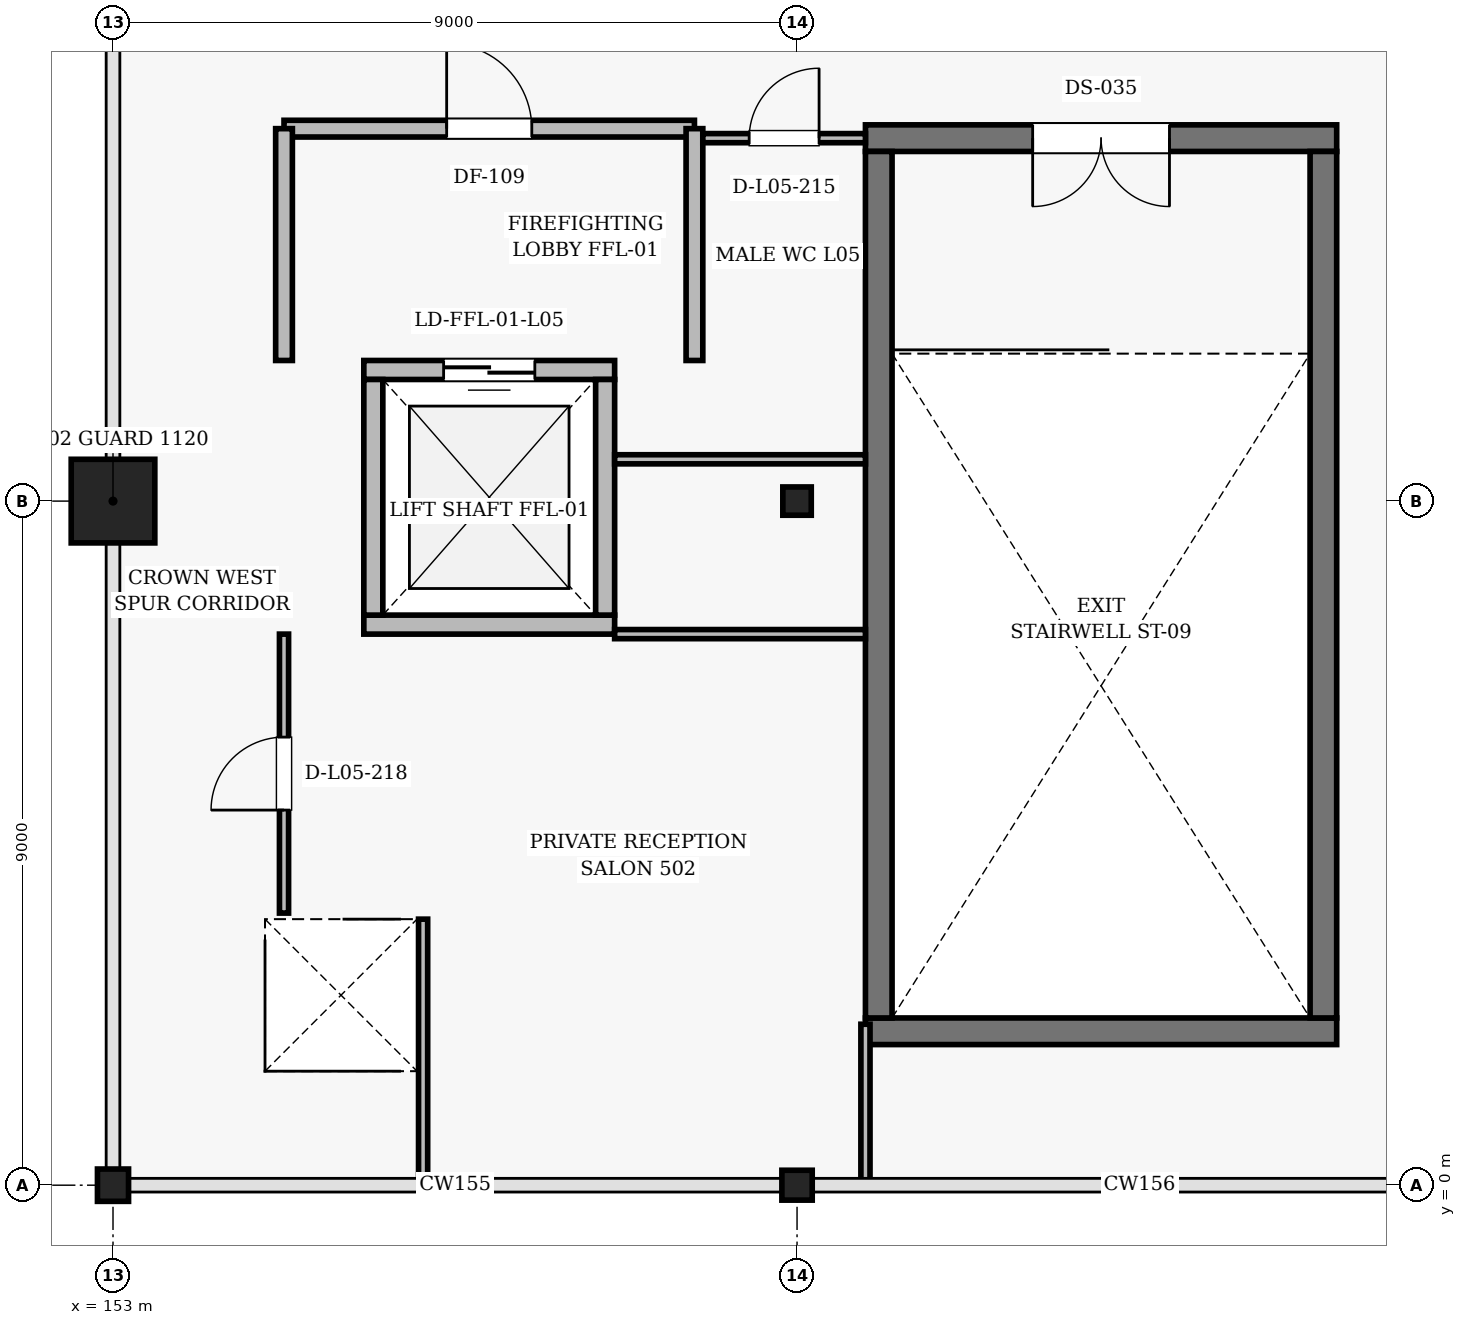
"""IFC4 building model, lengths in metres.
Left out: names, types, materials, properties, quantities, classifications, styles, units other than length and angle.
Written with IfcOpenShell. Run it as: python <this file> out.ifc"""

import sys

from ifc_helpers import new_model, si_unit, direction, frame, frame_2d, origin, origin_2d, place, context, subcontext, project, spatial, rectangle, i_section, extrude, element, fill, save


model = new_model("IFC4")
c1 = context("Model", 3, precision=1e-05, world=origin(), true_north=direction((0.0, 1.0)))
c2 = subcontext(c1, "Body", "Model", "MODEL_VIEW")
j1 = project(units=[si_unit("LENGTHUNIT", "METRE"), si_unit("PLANEANGLEUNIT", "RADIAN")], contexts=[c1])
p1 = place(None, origin())
s1 = spatial("IfcSite", under=j1, at=p1, CompositionType="ELEMENT")
p2 = place(p1, origin())
s2 = spatial("IfcBuilding", under=s1, at=p2, CompositionType="ELEMENT")
p3 = place(p2, frame((0.0, 0.0, 25.2)))
s3 = spatial("IfcBuildingStorey", under=s2, at=p3, CompositionType="ELEMENT", Elevation=25.2)
p4 = place(p3, frame((153.0, 0.0, 0.0), z_axis=(0.0, 0.0, 1.0), x_axis=(1.0, 0.0, 0.0)))
e1 = element("IfcColumn", 1, at=p4, inside=s3, PredefinedType="COLUMN", context=c2, shape_type="SweptSolid", body=[
    extrude(i_section(OverallWidth=0.409, OverallDepth=0.425, WebThickness=0.031, FlangeThickness=0.049, FilletRadius=0.02, at=origin_2d()), origin(), (0.0, 0.0, 1.0), 4.8),
])
p5 = place(p3, frame((153.0, 9.0, 0.0), z_axis=(0.0, 0.0, 1.0), x_axis=(1.0, 0.0, 0.0)))
e2 = element("IfcColumn", 2, at=p5, inside=s3, PredefinedType="COLUMN", context=c2, shape_type="SweptSolid", body=[
    extrude(rectangle(XDim=1.1, YDim=1.1, at=origin_2d()), origin(), (0.0, 0.0, 1.0), 4.8),
])
p6 = place(p3, frame((162.0, 0.0, 0.0), z_axis=(0.0, 0.0, 1.0), x_axis=(1.0, 0.0, 0.0)))
e3 = element("IfcColumn", 3, at=p6, inside=s3, PredefinedType="COLUMN", context=c2, shape_type="SweptSolid", body=[
    extrude(i_section(OverallWidth=0.399, OverallDepth=0.393, WebThickness=0.023, FlangeThickness=0.037, FilletRadius=0.018, at=origin_2d()), origin(), (0.0, 0.0, 1.0), 4.8),
])
p7 = place(p3, frame((162.0, 9.0, 0.0), z_axis=(0.0, 0.0, 1.0), x_axis=(1.0, 0.0, 0.0)))
e4 = element("IfcColumn", 4, at=p7, inside=s3, PredefinedType="COLUMN", context=c2, shape_type="SweptSolid", body=[
    extrude(i_section(OverallWidth=0.374, OverallDepth=0.372, WebThickness=0.016, FlangeThickness=0.026, FilletRadius=0.016, at=origin_2d()), origin(), (0.0, 0.0, 1.0), 4.8),
])
p8 = place(p3, frame((162.9, 2.025, 0.0), z_axis=(0.0, 0.0, 1.0), x_axis=(1.0, 0.0, 0.0)))
e5 = element("IfcWall", 5, at=p8, inside=s3, PredefinedType="SHEAR", context=c2, shape_type="SweptSolid", body=[
    extrude(rectangle(XDim=6.2, YDim=0.35, at=frame_2d((3.1, 0.0))), origin(), (0.0, 0.0, 1.0), 4.8),
])
p9 = place(p3, frame((169.1, 13.775, 0.0), z_axis=(0.0, 0.0, 1.0), x_axis=(-1.0, 0.0, 0.0)))
e6 = element("IfcWall", 6, at=p9, inside=s3, PredefinedType="SHEAR", context=c2, shape_type="SweptSolid", body=[
    extrude(rectangle(XDim=6.2, YDim=0.35, at=frame_2d((3.1, 0.0))), origin(), (0.0, 0.0, 1.0), 4.8),
])
p10 = place(p9, frame((2.2, 0.0, 0.0)))
e7 = element("IfcOpeningElement", 7, at=p10, cuts=e6, PredefinedType="OPENING", context=c2, shape_type="SweptSolid", body=[
    extrude(rectangle(XDim=1.8, YDim=2.2, at=frame_2d((0.9, 1.1))), frame((0.0, 0.185, 0.0), z_axis=(0.0, -1.0, 0.0), x_axis=(1.0, 0.0, 0.0)), (0.0, 0.0, 1.0), 0.37),
])
for number, where, z_axis, x_axis in (
    (8, (163.075, 13.6, 0.0), (0.0, 0.0, 1.0), (0.0, -1.0, 0.0)),
    (9, (168.925, 2.2, 0.0), (0.0, 0.0, 1.0), (0.0, 1.0, 0.0)),
):
    element("IfcWall", number, at=place(p3, frame(where, z_axis=z_axis, x_axis=x_axis)), inside=s3, PredefinedType="SHEAR", context=c2, shape_type="SweptSolid", body=[
        extrude(rectangle(XDim=11.4, YDim=0.35, at=frame_2d((5.7, 0.0))), origin(), (0.0, 0.0, 1.0), 4.8),
    ])
p11 = place(p3, frame((156.3, 7.375, 0.0), z_axis=(0.0, 0.0, 1.0), x_axis=(1.0, 0.0, 0.0)))
e10 = element("IfcWall", 10, at=p11, inside=s3, PredefinedType="SOLIDWALL", context=c2, shape_type="SweptSolid", body=[
    extrude(rectangle(XDim=3.3, YDim=0.25, at=frame_2d((1.65, 0.0))), origin(), (0.0, 0.0, 1.0), 4.6),
])
p12 = place(p3, frame((159.6, 10.725, 0.0), z_axis=(0.0, 0.0, 1.0), x_axis=(-1.0, 0.0, 0.0)))
e11 = element("IfcWall", 11, at=p12, inside=s3, PredefinedType="SOLIDWALL", context=c2, shape_type="SweptSolid", body=[
    extrude(rectangle(XDim=3.3, YDim=0.25, at=frame_2d((1.65, 0.0))), origin(), (0.0, 0.0, 1.0), 4.6),
])
p13 = place(p12, frame((1.05, 0.0, 0.0)))
e12 = element("IfcOpeningElement", 12, at=p13, cuts=e11, PredefinedType="OPENING", context=c2, shape_type="SweptSolid", body=[
    extrude(rectangle(XDim=1.2, YDim=2.25, at=frame_2d((0.6, 1.125))), frame((0.0, 0.135, 0.0), z_axis=(0.0, -1.0, 0.0), x_axis=(1.0, 0.0, 0.0)), (0.0, 0.0, 1.0), 0.27),
])
for number, where, z_axis, x_axis in (
    (13, (156.425, 10.6, 0.0), (0.0, 0.0, 1.0), (0.0, -1.0, 0.0)),
    (14, (159.475, 7.5, 0.0), (0.0, 0.0, 1.0), (0.0, 1.0, 0.0)),
):
    element("IfcWall", number, at=place(p3, frame(where, z_axis=z_axis, x_axis=x_axis)), inside=s3, PredefinedType="SOLIDWALL", context=c2, shape_type="SweptSolid", body=[
        extrude(rectangle(XDim=3.1, YDim=0.25, at=frame_2d((1.55, 0.0))), origin(), (0.0, 0.0, 1.0), 4.09),
    ])
p14 = place(p3, frame((155.25, 13.9, 0.0), z_axis=(0.0, 0.0, 1.0), x_axis=(1.0, 0.0, 0.0)))
e15 = element("IfcWall", 15, at=p14, inside=s3, PredefinedType="SOLIDWALL", context=c2, shape_type="SweptSolid", body=[
    extrude(rectangle(XDim=5.4, YDim=0.22, at=frame_2d((2.7, 0.0))), origin(), (0.0, 0.0, 1.0), 4.6),
])
p15 = place(p14, frame((2.14, 0.0, 0.0)))
e16 = element("IfcOpeningElement", 16, at=p15, cuts=e15, PredefinedType="OPENING", context=c2, shape_type="SweptSolid", body=[
    extrude(rectangle(XDim=1.12, YDim=2.2, at=frame_2d((0.56, 1.1))), frame((0.0, 0.12, 0.0), z_axis=(0.0, -1.0, 0.0), x_axis=(1.0, 0.0, 0.0)), (0.0, 0.0, 1.0), 0.24),
])
for number, where, z_axis, x_axis in (
    (17, (155.25, 10.85, 0.0), (0.0, 0.0, 1.0), (0.0, 1.0, 0.0)),
    (18, (160.65, 10.85, 0.0), (0.0, 0.0, 1.0), (0.0, 1.0, 0.0)),
):
    element("IfcWall", number, at=place(p3, frame(where, z_axis=z_axis, x_axis=x_axis)), inside=s3, PredefinedType="SOLIDWALL", context=c2, shape_type="SweptSolid", body=[
        extrude(rectangle(XDim=3.05, YDim=0.22, at=frame_2d((1.525, 0.0))), origin(), (0.0, 0.0, 1.0), 4.6),
    ])
p16 = place(p3, frame((160.76, 13.775, 0.0), z_axis=(0.0, 0.0, 1.0), x_axis=(1.0, 0.0, 0.0)))
e19 = element("IfcWall", 19, at=p16, inside=s3, PredefinedType="PARTITIONING", context=c2, shape_type="SweptSolid", body=[
    extrude(rectangle(XDim=2.14, YDim=0.12, at=frame_2d((1.07, 0.0))), origin(), (0.0, 0.0, 1.0), 4.101),
])
p17 = place(p16, frame((0.61, 0.0, 0.0)))
e20 = element("IfcOpeningElement", 20, at=p17, cuts=e19, PredefinedType="OPENING", context=c2, shape_type="SweptSolid", body=[
    extrude(rectangle(XDim=0.92, YDim=2.12, at=frame_2d((0.46, 1.06))), frame((0.0, 0.07, 0.0), z_axis=(0.0, -1.0, 0.0), x_axis=(1.0, 0.0, 0.0)), (0.0, 0.0, 1.0), 0.14),
])
p18 = place(p3, frame((162.9, 9.55, 0.0), z_axis=(0.0, 0.0, 1.0), x_axis=(-1.0, 0.0, 0.0)))
e21 = element("IfcWall", 21, at=p18, inside=s3, PredefinedType="PARTITIONING", context=c2, shape_type="SweptSolid", body=[
    extrude(rectangle(XDim=3.3, YDim=0.12, at=frame_2d((1.65, 0.0))), origin(), (0.0, 0.0, 1.0), 4.101),
])
p19 = place(p3, frame((159.6, 7.25, 0.0), z_axis=(0.0, 0.0, 1.0), x_axis=(1.0, 0.0, 0.0)))
e22 = element("IfcWall", 22, at=p19, inside=s3, PredefinedType="PARTITIONING", context=c2, shape_type="SweptSolid", body=[
    extrude(rectangle(XDim=3.3, YDim=0.12, at=frame_2d((1.65, 0.0))), origin(), (0.0, 0.0, 1.0), 4.09),
])
p20 = place(p3, frame((162.9, 2.117, 0.0), z_axis=(0.0, 0.0, 1.0), x_axis=(0.0, -1.0, 0.0)))
e23 = element("IfcWall", 23, at=p20, inside=s3, PredefinedType="PARTITIONING", context=c2, shape_type="SweptSolid", body=[
    extrude(rectangle(XDim=2.105, YDim=0.12, at=frame_2d((1.053, 0.0))), origin(), (0.0, 0.0, 1.0), 3.794),
])
p21 = place(p3, frame((157.08, 0.012, 0.0), z_axis=(0.0, 0.0, 1.0), x_axis=(0.0, 1.0, 0.0)))
e24 = element("IfcWall", 24, at=p21, inside=s3, PredefinedType="PARTITIONING", context=c2, shape_type="SweptSolid", body=[
    extrude(rectangle(XDim=3.488, YDim=0.12, at=frame_2d((1.744, 0.0))), origin(), (0.0, 0.0, 1.0), 3.794),
])
p22 = place(p3, frame((155.25, 3.58, 0.0), z_axis=(0.0, 0.0, 1.0), x_axis=(0.0, 1.0, 0.0)))
e25 = element("IfcWall", 25, at=p22, inside=s3, PredefinedType="PARTITIONING", context=c2, shape_type="SweptSolid", body=[
    extrude(rectangle(XDim=3.67, YDim=0.12, at=frame_2d((1.835, 0.0))), origin(), (0.0, 0.0, 1.0), 4.6),
])
p23 = place(p22, frame((1.355, 0.0, 0.0)))
e26 = element("IfcOpeningElement", 26, at=p23, cuts=e25, PredefinedType="OPENING", context=c2, shape_type="SweptSolid", body=[
    extrude(rectangle(XDim=0.96, YDim=2.15, at=frame_2d((0.48, 1.075))), frame((0.0, 0.07, 0.0), z_axis=(0.0, -1.0, 0.0), x_axis=(1.0, 0.0, 0.0)), (0.0, 0.0, 1.0), 0.14),
])
p24 = place(p10, origin())
e27 = element("IfcDoor", 27, at=p24, inside=s3, OperationType="DOUBLE_DOOR_SINGLE_SWING", PredefinedType="DOOR", context=c2, shape_type="SweptSolid", body=[
    extrude(rectangle(XDim=1.8, YDim=2.2, at=frame_2d((0.9, 1.1))), frame((0.0, 0.025, 0.0), z_axis=(0.0, -1.0, 0.0), x_axis=(1.0, 0.0, 0.0)), (0.0, 0.0, 1.0), 0.05),
])
fill(e7, e27)
p25 = place(p13, origin())
e28 = element("IfcDoor", 28, at=p25, inside=s3, OperationType="DOUBLE_DOOR_SLIDING", PredefinedType="DOOR", context=c2, shape_type="SweptSolid", body=[
    extrude(rectangle(XDim=1.2, YDim=2.25, at=frame_2d((0.6, 1.125))), frame((0.0, 0.025, 0.0), z_axis=(0.0, -1.0, 0.0), x_axis=(1.0, 0.0, 0.0)), (0.0, 0.0, 1.0), 0.05),
])
fill(e12, e28)
p26 = place(p15, origin())
e29 = element("IfcDoor", 29, at=p26, inside=s3, OperationType="SINGLE_SWING_LEFT", PredefinedType="DOOR", context=c2, shape_type="SweptSolid", body=[
    extrude(rectangle(XDim=1.12, YDim=2.2, at=frame_2d((0.56, 1.1))), frame((0.0, 0.025, 0.0), z_axis=(0.0, -1.0, 0.0), x_axis=(1.0, 0.0, 0.0)), (0.0, 0.0, 1.0), 0.05),
])
fill(e16, e29)
p27 = place(p17, origin())
e30 = element("IfcDoor", 30, at=p27, inside=s3, OperationType="SINGLE_SWING_RIGHT", PredefinedType="DOOR", context=c2, shape_type="SweptSolid", body=[
    extrude(rectangle(XDim=0.92, YDim=2.12, at=frame_2d((0.46, 1.06))), frame((0.0, 0.025, 0.0), z_axis=(0.0, -1.0, 0.0), x_axis=(1.0, 0.0, 0.0)), (0.0, 0.0, 1.0), 0.05),
])
fill(e20, e30)
p28 = place(p23, origin())
e31 = element("IfcDoor", 31, at=p28, inside=s3, OperationType="SINGLE_SWING_LEFT", PredefinedType="DOOR", context=c2, shape_type="SweptSolid", body=[
    extrude(rectangle(XDim=0.96, YDim=2.15, at=frame_2d((0.48, 1.075))), frame((0.0, 0.025, 0.0), z_axis=(0.0, -1.0, 0.0), x_axis=(1.0, 0.0, 0.0)), (0.0, 0.0, 1.0), 0.05),
])
fill(e26, e31)
save(model, sys.argv[1])
